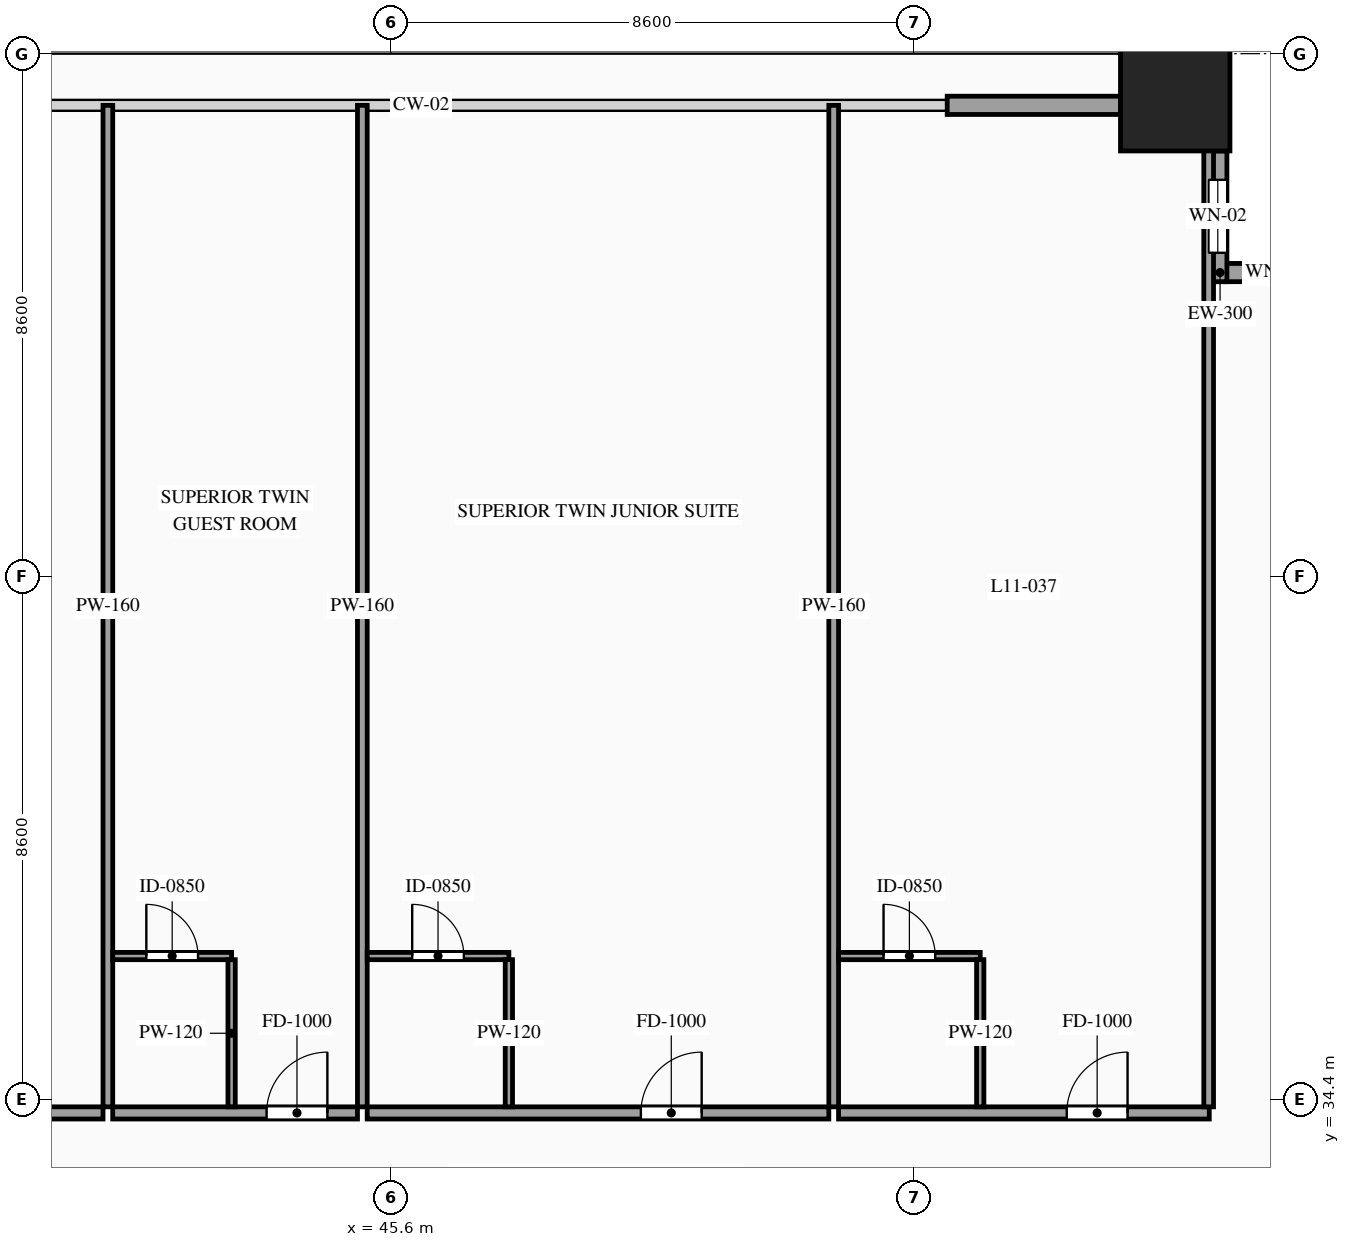
"""IFC4 building model, lengths in metres.
Left out: names, types, materials, properties, quantities, classifications, styles, units other than length and angle.
Written with IfcOpenShell. Run it as: python <this file> out.ifc"""

import sys

from ifc_helpers import new_model, si_unit, direction, frame, frame_2d, origin, origin_2d, place, context, subcontext, project, spatial, rectangle, hollow_rectangle, extrude, source, transform, mapped, element, fill, save


model = new_model("IFC4")
c1 = context("Model", 3, precision=1e-05, world=origin(), true_north=direction((0.0, 1.0)))
c2 = subcontext(c1, "Body", "Model", "MODEL_VIEW")
j1 = project(units=[si_unit("LENGTHUNIT", "METRE"), si_unit("PLANEANGLEUNIT", "RADIAN")], contexts=[c1])
p1 = place(None, origin())
s1 = spatial("IfcSite", under=j1, at=p1, CompositionType="ELEMENT")
p2 = place(p1, origin())
s2 = spatial("IfcBuilding", under=s1, at=p2, CompositionType="ELEMENT")
p3 = place(p2, frame((0.0, 0.0, 46.0)))
s3 = spatial("IfcBuildingStorey", under=s2, at=p3, CompositionType="ELEMENT", Elevation=46.0)
m1 = source(origin(), c2, "Body", "SweptSolid", [
    extrude(hollow_rectangle(XDim=1.8, YDim=1.8, WallThickness=0.08, at=origin_2d()), origin(), (0.0, 0.0, 1.0), 3.6),
])
p4 = place(p3, frame((58.5, 50.9, 0.0), z_axis=(0.0, 0.0, 1.0), x_axis=(1.0, 0.0, 0.0)))
e1 = element("IfcColumn", 1, at=p4, inside=s3, PredefinedType="COLUMN", context=c2, shape_type="MappedRepresentation", body=[
    mapped(m1, transform((0.0, 0.0, 0.0), scale=1.0)),
])
p5 = place(p3, frame((61.2, 48.0, 0.0), z_axis=(0.0, 0.0, 1.0), x_axis=(-1.0, 0.0, 0.0)))
e2 = element("IfcWall", 2, at=p5, inside=s3, PredefinedType="SOLIDWALL", context=c2, shape_type="SweptSolid", body=[
    extrude(rectangle(XDim=2.15, YDim=0.3, at=frame_2d((1.075, 0.0))), origin(), (0.0, 0.0, 1.0), 3.38),
])
p6 = place(p5, frame((0.625, 0.0, 0.85)))
e3 = element("IfcOpeningElement", 3, at=p6, cuts=e2, PredefinedType="OPENING", context=c2, shape_type="SweptSolid", body=[
    extrude(rectangle(XDim=0.9, YDim=1.5, at=frame_2d((0.45, 0.75))), frame((0.0, 0.165, 0.0), z_axis=(0.0, -1.0, 0.0), x_axis=(1.0, 0.0, 0.0)), (0.0, 0.0, 1.0), 0.33),
])
p7 = place(p3, frame((59.2, 47.85, 0.0), z_axis=(0.0, 0.0, 1.0), x_axis=(0.0, 1.0, 0.0)))
e4 = element("IfcWall", 4, at=p7, inside=s3, PredefinedType="SOLIDWALL", context=c2, shape_type="SweptSolid", body=[
    extrude(rectangle(XDim=2.15, YDim=0.3, at=frame_2d((1.075, 0.0))), origin(), (0.0, 0.0, 1.0), 3.38),
])
p8 = place(p7, frame((0.475, 0.0, 0.85)))
e5 = element("IfcOpeningElement", 5, at=p8, cuts=e4, PredefinedType="OPENING", context=c2, shape_type="SweptSolid", body=[
    extrude(rectangle(XDim=1.2, YDim=2.1, at=frame_2d((0.6, 1.05))), frame((0.0, 0.165, 0.0), z_axis=(0.0, -1.0, 0.0), x_axis=(1.0, 0.0, 0.0)), (0.0, 0.0, 1.0), 0.33),
])
m2 = source(origin(), c2, "Body", "SweptSolid", [
    extrude(rectangle(XDim=2.85, YDim=0.3, at=frame_2d((1.425, 0.0))), origin(), (0.0, 0.0, 1.0), 2.775),
])
p9 = place(p3, frame((54.75, 50.75, 0.0), z_axis=(0.0, 0.0, 1.0), x_axis=(1.0, 0.0, 0.0)))
e6 = element("IfcWall", 6, at=p9, inside=s3, PredefinedType="SOLIDWALL", context=c2, shape_type="MappedRepresentation", body=[
    mapped(m2, transform((0.0, 0.0, 0.0), scale=1.0)),
])
p10 = place(p3, frame((32.605, 34.18, 0.0), z_axis=(0.0, 0.0, 1.0), x_axis=(1.0, 0.0, 0.0)))
e7 = element("IfcWall", 7, at=p10, inside=s3, PredefinedType="PARTITIONING", context=c2, shape_type="SweptSolid", body=[
    extrude(rectangle(XDim=8.261, YDim=0.2, at=frame_2d((4.13, 0.0))), origin(), (0.0, 0.0, 1.0), 3.38),
])
p11 = place(p10, frame((4.836, 0.0, 0.0)))
e8 = element("IfcOpeningElement", 8, at=p11, cuts=e7, PredefinedType="OPENING", context=c2, shape_type="SweptSolid", body=[
    extrude(rectangle(XDim=1.0, YDim=2.2, at=frame_2d((0.5, 1.1))), frame((0.0, 0.115, 0.0), z_axis=(0.0, -1.0, 0.0), x_axis=(1.0, 0.0, 0.0)), (0.0, 0.0, 1.0), 0.23),
])
m3 = source(origin(), c2, "Body", "SweptSolid", [
    extrude(rectangle(XDim=16.47, YDim=0.16, at=frame_2d((8.235, 0.0))), origin(), (0.0, 0.0, 1.0), 3.38),
])
p12 = place(p3, frame((40.946, 34.28, 0.0), z_axis=(0.0, 0.0, 1.0), x_axis=(0.0, 1.0, 0.0)))
e9 = element("IfcWall", 9, at=p12, inside=s3, PredefinedType="PARTITIONING", context=c2, shape_type="MappedRepresentation", body=[
    mapped(m3, transform((0.0, 0.0, 0.0), scale=1.0)),
])
p13 = place(p3, frame((41.026, 34.18, 0.0), z_axis=(0.0, 0.0, 1.0), x_axis=(1.0, 0.0, 0.0)))
e10 = element("IfcWall", 10, at=p13, inside=s3, PredefinedType="PARTITIONING", context=c2, shape_type="SweptSolid", body=[
    extrude(rectangle(XDim=4.025, YDim=0.2, at=frame_2d((2.013, 0.0))), origin(), (0.0, 0.0, 1.0), 3.38),
])
p14 = place(p13, frame((2.53, 0.0, 0.0)))
e11 = element("IfcOpeningElement", 11, at=p14, cuts=e10, PredefinedType="OPENING", context=c2, shape_type="SweptSolid", body=[
    extrude(rectangle(XDim=1.0, YDim=2.2, at=frame_2d((0.5, 1.1))), frame((0.0, 0.115, 0.0), z_axis=(0.0, -1.0, 0.0), x_axis=(1.0, 0.0, 0.0)), (0.0, 0.0, 1.0), 0.23),
])
p15 = place(p3, frame((45.131, 34.28, 0.0), z_axis=(0.0, 0.0, 1.0), x_axis=(0.0, 1.0, 0.0)))
e12 = element("IfcWall", 12, at=p15, inside=s3, PredefinedType="PARTITIONING", context=c2, shape_type="MappedRepresentation", body=[
    mapped(m3, transform((0.0, 0.0, 0.0), scale=1.0)),
])
p16 = place(p3, frame((41.026, 36.76, 0.0), z_axis=(0.0, 0.0, 1.0), x_axis=(1.0, 0.0, 0.0)))
e13 = element("IfcWall", 13, at=p16, inside=s3, PredefinedType="PARTITIONING", context=c2, shape_type="SweptSolid", body=[
    extrude(rectangle(XDim=1.955, YDim=0.12, at=frame_2d((0.978, 0.0))), origin(), (0.0, 0.0, 1.0), 3.38),
])
p17 = place(p16, frame((0.552, 0.0, 0.0)))
e14 = element("IfcOpeningElement", 14, at=p17, cuts=e13, PredefinedType="OPENING", context=c2, shape_type="SweptSolid", body=[
    extrude(rectangle(XDim=0.85, YDim=2.1, at=frame_2d((0.425, 1.05))), frame((0.0, 0.075, 0.0), z_axis=(0.0, -1.0, 0.0), x_axis=(1.0, 0.0, 0.0)), (0.0, 0.0, 1.0), 0.15),
])
m4 = source(origin(), c2, "Body", "SweptSolid", [
    extrude(rectangle(XDim=2.42, YDim=0.12, at=frame_2d((1.21, 0.0))), origin(), (0.0, 0.0, 1.0), 3.38),
])
p18 = place(p3, frame((42.981, 34.28, 0.0), z_axis=(0.0, 0.0, 1.0), x_axis=(0.0, 1.0, 0.0)))
e15 = element("IfcWall", 15, at=p18, inside=s3, PredefinedType="PARTITIONING", context=c2, shape_type="MappedRepresentation", body=[
    mapped(m4, transform((0.0, 0.0, 0.0), scale=1.0)),
])
p19 = place(p3, frame((45.211, 34.18, 0.0), z_axis=(0.0, 0.0, 1.0), x_axis=(1.0, 0.0, 0.0)))
e16 = element("IfcWall", 16, at=p19, inside=s3, PredefinedType="PARTITIONING", context=c2, shape_type="SweptSolid", body=[
    extrude(rectangle(XDim=7.592, YDim=0.2, at=frame_2d((3.796, 0.0))), origin(), (0.0, 0.0, 1.0), 3.38),
])
p20 = place(p19, frame((4.501, 0.0, 0.0)))
e17 = element("IfcOpeningElement", 17, at=p20, cuts=e16, PredefinedType="OPENING", context=c2, shape_type="SweptSolid", body=[
    extrude(rectangle(XDim=1.0, YDim=2.2, at=frame_2d((0.5, 1.1))), frame((0.0, 0.115, 0.0), z_axis=(0.0, -1.0, 0.0), x_axis=(1.0, 0.0, 0.0)), (0.0, 0.0, 1.0), 0.23),
])
p21 = place(p3, frame((52.883, 34.28, 0.0), z_axis=(0.0, 0.0, 1.0), x_axis=(0.0, 1.0, 0.0)))
e18 = element("IfcWall", 18, at=p21, inside=s3, PredefinedType="PARTITIONING", context=c2, shape_type="MappedRepresentation", body=[
    mapped(m3, transform((0.0, 0.0, 0.0), scale=1.0)),
])
p22 = place(p3, frame((45.211, 36.76, 0.0), z_axis=(0.0, 0.0, 1.0), x_axis=(1.0, 0.0, 0.0)))
e19 = element("IfcWall", 19, at=p22, inside=s3, PredefinedType="PARTITIONING", context=c2, shape_type="SweptSolid", body=[
    extrude(rectangle(XDim=2.33, YDim=0.12, at=frame_2d((1.165, 0.0))), origin(), (0.0, 0.0, 1.0), 3.38),
])
p23 = place(p22, frame((0.74, 0.0, 0.0)))
e20 = element("IfcOpeningElement", 20, at=p23, cuts=e19, PredefinedType="OPENING", context=c2, shape_type="SweptSolid", body=[
    extrude(rectangle(XDim=0.85, YDim=2.1, at=frame_2d((0.425, 1.05))), frame((0.0, 0.075, 0.0), z_axis=(0.0, -1.0, 0.0), x_axis=(1.0, 0.0, 0.0)), (0.0, 0.0, 1.0), 0.15),
])
p24 = place(p3, frame((47.541, 34.28, 0.0), z_axis=(0.0, 0.0, 1.0), x_axis=(0.0, 1.0, 0.0)))
e21 = element("IfcWall", 21, at=p24, inside=s3, PredefinedType="PARTITIONING", context=c2, shape_type="MappedRepresentation", body=[
    mapped(m4, transform((0.0, 0.0, 0.0), scale=1.0)),
])
p25 = place(p3, frame((52.963, 34.18, 0.0), z_axis=(0.0, 0.0, 1.0), x_axis=(1.0, 0.0, 0.0)))
e22 = element("IfcWall", 22, at=p25, inside=s3, PredefinedType="PARTITIONING", context=c2, shape_type="SweptSolid", body=[
    extrude(rectangle(XDim=6.097, YDim=0.2, at=frame_2d((3.049, 0.0))), origin(), (0.0, 0.0, 1.0), 3.38),
])
p26 = place(p25, frame((3.753, 0.0, 0.0)))
e23 = element("IfcOpeningElement", 23, at=p26, cuts=e22, PredefinedType="OPENING", context=c2, shape_type="SweptSolid", body=[
    extrude(rectangle(XDim=1.0, YDim=2.2, at=frame_2d((0.5, 1.1))), frame((0.0, 0.115, 0.0), z_axis=(0.0, -1.0, 0.0), x_axis=(1.0, 0.0, 0.0)), (0.0, 0.0, 1.0), 0.23),
])
m5 = source(origin(), c2, "Body", "SweptSolid", [
    extrude(rectangle(XDim=16.32, YDim=0.16, at=frame_2d((8.16, 0.0))), origin(), (0.0, 0.0, 1.0), 3.38),
])
p27 = place(p3, frame((59.05, 34.28, 0.0), z_axis=(0.0, 0.0, 1.0), x_axis=(0.0, 1.0, 0.0)))
e24 = element("IfcWall", 24, at=p27, inside=s3, PredefinedType="PARTITIONING", context=c2, shape_type="MappedRepresentation", body=[
    mapped(m5, transform((0.0, 0.0, 0.0), scale=1.0)),
])
p28 = place(p3, frame((52.963, 36.76, 0.0), z_axis=(0.0, 0.0, 1.0), x_axis=(1.0, 0.0, 0.0)))
e25 = element("IfcWall", 25, at=p28, inside=s3, PredefinedType="PARTITIONING", context=c2, shape_type="SweptSolid", body=[
    extrude(rectangle(XDim=2.33, YDim=0.12, at=frame_2d((1.165, 0.0))), origin(), (0.0, 0.0, 1.0), 3.38),
])
p29 = place(p28, frame((0.74, 0.0, 0.0)))
e26 = element("IfcOpeningElement", 26, at=p29, cuts=e25, PredefinedType="OPENING", context=c2, shape_type="SweptSolid", body=[
    extrude(rectangle(XDim=0.85, YDim=2.1, at=frame_2d((0.425, 1.05))), frame((0.0, 0.075, 0.0), z_axis=(0.0, -1.0, 0.0), x_axis=(1.0, 0.0, 0.0)), (0.0, 0.0, 1.0), 0.15),
])
p30 = place(p3, frame((55.293, 34.28, 0.0), z_axis=(0.0, 0.0, 1.0), x_axis=(0.0, 1.0, 0.0)))
e27 = element("IfcWall", 27, at=p30, inside=s3, PredefinedType="PARTITIONING", context=c2, shape_type="MappedRepresentation", body=[
    mapped(m4, transform((0.0, 0.0, 0.0), scale=1.0)),
])
m6 = source(origin(), c2, "Body", "SweptSolid", [
    extrude(rectangle(XDim=0.9, YDim=1.5, at=frame_2d((0.45, 0.75))), frame((0.0, 0.03, 0.0), z_axis=(0.0, -1.0, 0.0), x_axis=(1.0, 0.0, 0.0)), (0.0, 0.0, 1.0), 0.06),
])
p31 = place(p6, origin())
e28 = element("IfcWindow", 28, at=p31, inside=s3, PartitioningType="SINGLE_PANEL", PredefinedType="WINDOW", context=c2, shape_type="MappedRepresentation", body=[
    mapped(m6, transform((0.0, 0.0, 0.0), scale=1.0)),
])
fill(e3, e28)
m7 = source(origin(), c2, "Body", "SweptSolid", [
    extrude(rectangle(XDim=1.2, YDim=2.1, at=frame_2d((0.6, 1.05))), frame((0.0, 0.03, 0.0), z_axis=(0.0, -1.0, 0.0), x_axis=(1.0, 0.0, 0.0)), (0.0, 0.0, 1.0), 0.06),
])
p32 = place(p8, origin())
e29 = element("IfcWindow", 29, at=p32, inside=s3, PartitioningType="SINGLE_PANEL", PredefinedType="WINDOW", context=c2, shape_type="MappedRepresentation", body=[
    mapped(m7, transform((0.0, 0.0, 0.0), scale=1.0)),
])
fill(e5, e29)
m8 = source(origin(), c2, "Body", "SweptSolid", [
    extrude(rectangle(XDim=1.0, YDim=2.2, at=frame_2d((0.5, 1.1))), frame((0.0, 0.025, 0.0), z_axis=(0.0, -1.0, 0.0), x_axis=(1.0, 0.0, 0.0)), (0.0, 0.0, 1.0), 0.05),
])
p33 = place(p14, origin())
e30 = element("IfcDoor", 30, at=p33, inside=s3, OperationType="SINGLE_SWING_RIGHT", PredefinedType="DOOR", context=c2, shape_type="MappedRepresentation", body=[
    mapped(m8, transform((0.0, 0.0, 0.0), scale=1.0)),
])
fill(e11, e30)
m9 = source(origin(), c2, "Body", "SweptSolid", [
    extrude(rectangle(XDim=0.85, YDim=2.1, at=frame_2d((0.425, 1.05))), frame((0.0, 0.025, 0.0), z_axis=(0.0, -1.0, 0.0), x_axis=(1.0, 0.0, 0.0)), (0.0, 0.0, 1.0), 0.05),
])
p34 = place(p17, origin())
e31 = element("IfcDoor", 31, at=p34, inside=s3, OperationType="SINGLE_SWING_LEFT", PredefinedType="DOOR", context=c2, shape_type="MappedRepresentation", body=[
    mapped(m9, transform((0.0, 0.0, 0.0), scale=1.0)),
])
fill(e14, e31)
p35 = place(p20, origin())
e32 = element("IfcDoor", 32, at=p35, inside=s3, OperationType="SINGLE_SWING_RIGHT", PredefinedType="DOOR", context=c2, shape_type="MappedRepresentation", body=[
    mapped(m8, transform((0.0, 0.0, 0.0), scale=1.0)),
])
fill(e17, e32)
p36 = place(p23, origin())
e33 = element("IfcDoor", 33, at=p36, inside=s3, OperationType="SINGLE_SWING_LEFT", PredefinedType="DOOR", context=c2, shape_type="MappedRepresentation", body=[
    mapped(m9, transform((0.0, 0.0, 0.0), scale=1.0)),
])
fill(e20, e33)
p37 = place(p26, origin())
e34 = element("IfcDoor", 34, at=p37, inside=s3, OperationType="SINGLE_SWING_RIGHT", PredefinedType="DOOR", context=c2, shape_type="MappedRepresentation", body=[
    mapped(m8, transform((0.0, 0.0, 0.0), scale=1.0)),
])
fill(e23, e34)
p38 = place(p29, origin())
e35 = element("IfcDoor", 35, at=p38, inside=s3, OperationType="SINGLE_SWING_LEFT", PredefinedType="DOOR", context=c2, shape_type="MappedRepresentation", body=[
    mapped(m9, transform((0.0, 0.0, 0.0), scale=1.0)),
])
fill(e26, e35)
save(model, sys.argv[1])
